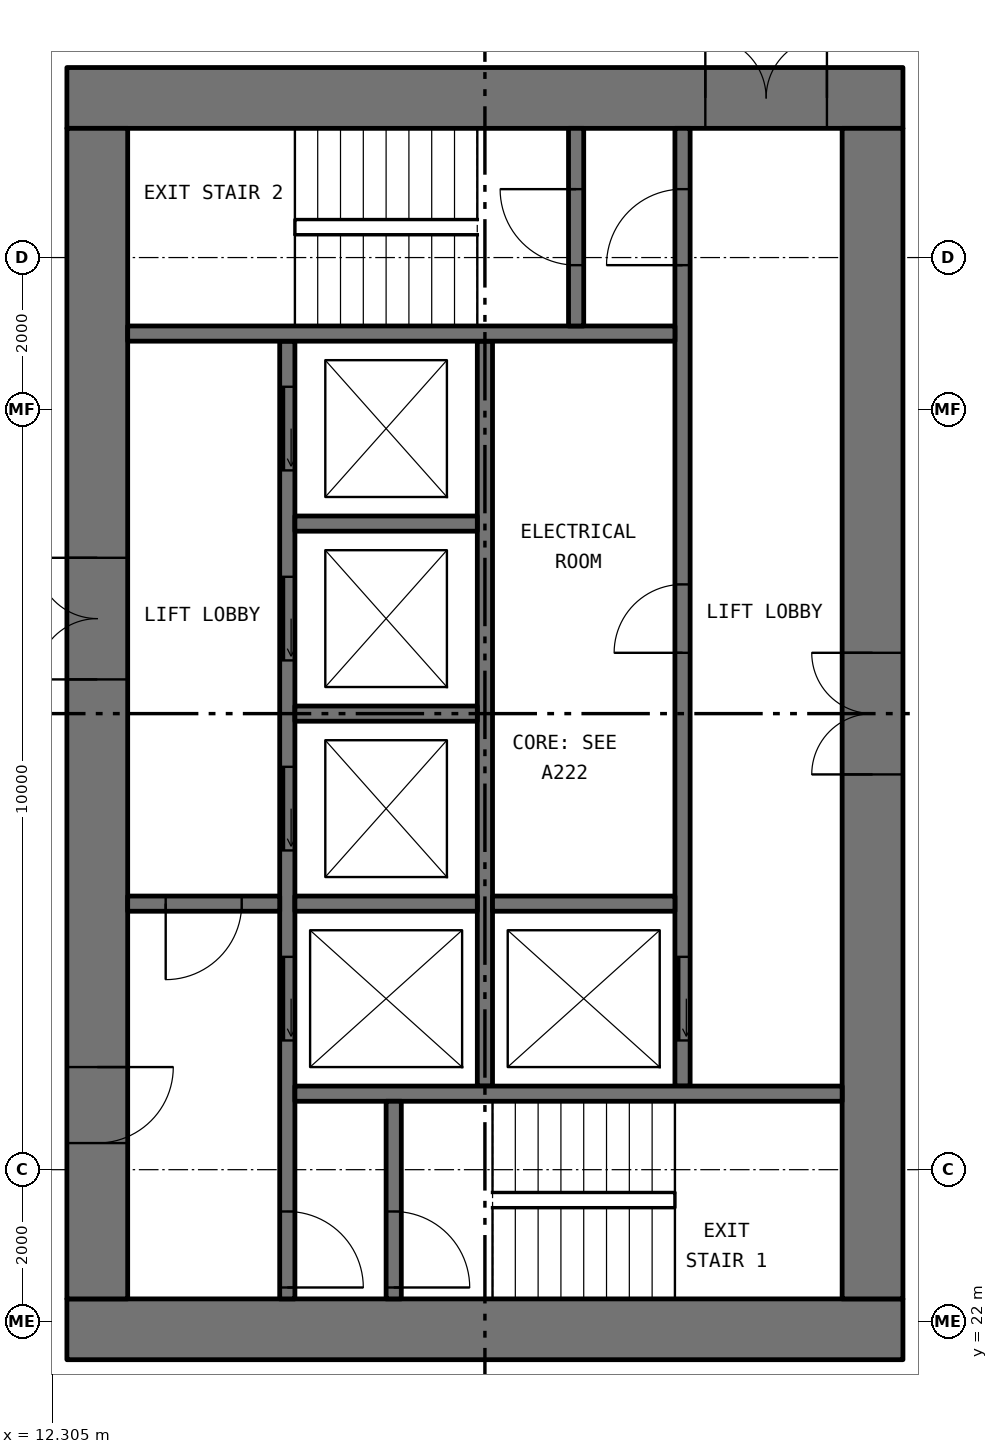
"""IFC4 building model, lengths in metres.
Left out: names, types, materials, properties, quantities, classifications, styles, units other than length and angle.
Written with IfcOpenShell. Run it as: python <this file> out.ifc"""

import sys

from ifc_helpers import new_model, si_unit, direction, frame, frame_2d, origin, place, context, subcontext, project, spatial, rectangle, extrude, element, fill, save


model = new_model("IFC4")
c1 = context("Model", 3, precision=1e-05, world=origin(), true_north=direction((0.0, 1.0)))
c2 = subcontext(c1, "Body", "Model", "MODEL_VIEW")
j1 = project(units=[si_unit("LENGTHUNIT", "METRE"), si_unit("PLANEANGLEUNIT", "RADIAN")], contexts=[c1])
p1 = place(None, origin())
s1 = spatial("IfcSite", under=j1, at=p1, CompositionType="ELEMENT")
p2 = place(p1, origin())
s2 = spatial("IfcBuilding", under=s1, at=p2, CompositionType="ELEMENT")
p3 = place(p2, frame((0.0, 0.0, 85.2)))
s3 = spatial("IfcBuildingStorey", under=s2, at=p3, CompositionType="ELEMENT", Elevation=85.2)
p4 = place(p3, frame((12.5, 21.9, 0.0), z_axis=(0.0, 0.0, 1.0), x_axis=(1.0, 0.0, 0.0)))
e1 = element("IfcWall", 1, at=p4, inside=s3, PredefinedType="SHEAR", context=c2, shape_type="SweptSolid", body=[
    extrude(rectangle(XDim=11.0, YDim=0.8, at=frame_2d((5.5, 0.0))), origin(), (0.0, 0.0, 1.0), 3.05),
])
p5 = place(p3, frame((12.5, 38.1, 0.0), z_axis=(0.0, 0.0, 1.0), x_axis=(1.0, 0.0, 0.0)))
e2 = element("IfcWall", 2, at=p5, inside=s3, PredefinedType="SHEAR", context=c2, shape_type="SweptSolid", body=[
    extrude(rectangle(XDim=11.0, YDim=0.8, at=frame_2d((5.5, 0.0))), origin(), (0.0, 0.0, 1.0), 3.05),
])
p6 = place(p5, frame((8.4, 0.0, 0.0)))
e3 = element("IfcOpeningElement", 3, at=p6, cuts=e2, PredefinedType="OPENING", context=c2, shape_type="SweptSolid", body=[
    extrude(rectangle(XDim=1.6, YDim=2.1, at=frame_2d((0.8, 1.05))), frame((0.0, 0.41, 0.0), z_axis=(0.0, -1.0, 0.0), x_axis=(1.0, 0.0, 0.0)), (0.0, 0.0, 1.0), 0.82),
])
p7 = place(p3, frame((12.9, 22.3, 0.0), z_axis=(0.0, 0.0, 1.0), x_axis=(0.0, 1.0, 0.0)))
e4 = element("IfcWall", 4, at=p7, inside=s3, PredefinedType="SHEAR", context=c2, shape_type="SweptSolid", body=[
    extrude(rectangle(XDim=15.4, YDim=0.8, at=frame_2d((7.7, 0.0))), origin(), (0.0, 0.0, 1.0), 3.05),
])
p8 = place(p7, frame((8.15, 0.0, 0.0)))
e5 = element("IfcOpeningElement", 5, at=p8, cuts=e4, PredefinedType="OPENING", context=c2, shape_type="SweptSolid", body=[
    extrude(rectangle(XDim=1.6, YDim=2.1, at=frame_2d((0.8, 1.05))), frame((0.0, 0.41, 0.0), z_axis=(0.0, -1.0, 0.0), x_axis=(1.0, 0.0, 0.0)), (0.0, 0.0, 1.0), 0.82),
])
p9 = place(p7, frame((2.05, 0.0, 0.0)))
e6 = element("IfcOpeningElement", 6, at=p9, cuts=e4, PredefinedType="OPENING", context=c2, shape_type="SweptSolid", body=[
    extrude(rectangle(XDim=1.0, YDim=2.1, at=frame_2d((0.5, 1.05))), frame((0.0, 0.41, 0.0), z_axis=(0.0, -1.0, 0.0), x_axis=(1.0, 0.0, 0.0)), (0.0, 0.0, 1.0), 0.82),
])
p10 = place(p3, frame((23.1, 22.3, 0.0), z_axis=(0.0, 0.0, 1.0), x_axis=(0.0, 1.0, 0.0)))
e7 = element("IfcWall", 7, at=p10, inside=s3, PredefinedType="SHEAR", context=c2, shape_type="SweptSolid", body=[
    extrude(rectangle(XDim=15.4, YDim=0.8, at=frame_2d((7.7, 0.0))), origin(), (0.0, 0.0, 1.0), 3.05),
])
p11 = place(p10, frame((6.9, 0.0, 0.0)))
e8 = element("IfcOpeningElement", 8, at=p11, cuts=e7, PredefinedType="OPENING", context=c2, shape_type="SweptSolid", body=[
    extrude(rectangle(XDim=1.6, YDim=2.1, at=frame_2d((0.8, 1.05))), frame((0.0, 0.41, 0.0), z_axis=(0.0, -1.0, 0.0), x_axis=(1.0, 0.0, 0.0)), (0.0, 0.0, 1.0), 0.82),
])
p12 = place(p3, frame((15.4, 22.3, 0.0), z_axis=(0.0, 0.0, 1.0), x_axis=(0.0, 1.0, 0.0)))
e9 = element("IfcWall", 9, at=p12, inside=s3, PredefinedType="SOLIDWALL", context=c2, shape_type="SweptSolid", body=[
    extrude(rectangle(XDim=12.6, YDim=0.2, at=frame_2d((6.3, 0.0))), origin(), (0.0, 0.0, 1.0), 3.05),
])
p13 = place(p12, frame((3.4, 0.0, 0.0)))
e10 = element("IfcOpeningElement", 10, at=p13, cuts=e9, PredefinedType="OPENING", context=c2, shape_type="SweptSolid", body=[
    extrude(rectangle(XDim=1.1, YDim=2.1, at=frame_2d((0.55, 1.05))), frame((0.0, 0.11, 0.0), z_axis=(0.0, -1.0, 0.0), x_axis=(1.0, 0.0, 0.0)), (0.0, 0.0, 1.0), 0.22),
])
p14 = place(p12, frame((5.9, 0.0, 0.0)))
e11 = element("IfcOpeningElement", 11, at=p14, cuts=e9, PredefinedType="OPENING", context=c2, shape_type="SweptSolid", body=[
    extrude(rectangle(XDim=1.1, YDim=2.1, at=frame_2d((0.55, 1.05))), frame((0.0, 0.11, 0.0), z_axis=(0.0, -1.0, 0.0), x_axis=(1.0, 0.0, 0.0)), (0.0, 0.0, 1.0), 0.22),
])
p15 = place(p12, frame((8.4, 0.0, 0.0)))
e12 = element("IfcOpeningElement", 12, at=p15, cuts=e9, PredefinedType="OPENING", context=c2, shape_type="SweptSolid", body=[
    extrude(rectangle(XDim=1.1, YDim=2.1, at=frame_2d((0.55, 1.05))), frame((0.0, 0.11, 0.0), z_axis=(0.0, -1.0, 0.0), x_axis=(1.0, 0.0, 0.0)), (0.0, 0.0, 1.0), 0.22),
])
p16 = place(p12, frame((10.9, 0.0, 0.0)))
e13 = element("IfcOpeningElement", 13, at=p16, cuts=e9, PredefinedType="OPENING", context=c2, shape_type="SweptSolid", body=[
    extrude(rectangle(XDim=1.1, YDim=2.1, at=frame_2d((0.55, 1.05))), frame((0.0, 0.11, 0.0), z_axis=(0.0, -1.0, 0.0), x_axis=(1.0, 0.0, 0.0)), (0.0, 0.0, 1.0), 0.22),
])
p17 = place(p12, frame((0.15, 0.0, 0.0)))
e14 = element("IfcOpeningElement", 14, at=p17, cuts=e9, PredefinedType="OPENING", context=c2, shape_type="SweptSolid", body=[
    extrude(rectangle(XDim=1.0, YDim=2.1, at=frame_2d((0.5, 1.05))), frame((0.0, 0.11, 0.0), z_axis=(0.0, -1.0, 0.0), x_axis=(1.0, 0.0, 0.0)), (0.0, 0.0, 1.0), 0.22),
])
p18 = place(p3, frame((20.6, 25.1, 0.0), z_axis=(0.0, 0.0, 1.0), x_axis=(0.0, 1.0, 0.0)))
e15 = element("IfcWall", 15, at=p18, inside=s3, PredefinedType="SOLIDWALL", context=c2, shape_type="SweptSolid", body=[
    extrude(rectangle(XDim=12.6, YDim=0.2, at=frame_2d((6.3, 0.0))), origin(), (0.0, 0.0, 1.0), 3.05),
])
p19 = place(p18, frame((0.6, 0.0, 0.0)))
e16 = element("IfcOpeningElement", 16, at=p19, cuts=e15, PredefinedType="OPENING", context=c2, shape_type="SweptSolid", body=[
    extrude(rectangle(XDim=1.1, YDim=2.1, at=frame_2d((0.55, 1.05))), frame((0.0, 0.11, 0.0), z_axis=(0.0, -1.0, 0.0), x_axis=(1.0, 0.0, 0.0)), (0.0, 0.0, 1.0), 0.22),
])
p20 = place(p18, frame((10.8, 0.0, 0.0)))
e17 = element("IfcOpeningElement", 17, at=p20, cuts=e15, PredefinedType="OPENING", context=c2, shape_type="SweptSolid", body=[
    extrude(rectangle(XDim=1.0, YDim=2.1, at=frame_2d((0.5, 1.05))), frame((0.0, 0.11, 0.0), z_axis=(0.0, -1.0, 0.0), x_axis=(1.0, 0.0, 0.0)), (0.0, 0.0, 1.0), 0.22),
])
p21 = place(p18, frame((5.7, 0.0, 0.0)))
e18 = element("IfcOpeningElement", 18, at=p21, cuts=e15, PredefinedType="OPENING", context=c2, shape_type="SweptSolid", body=[
    extrude(rectangle(XDim=0.9, YDim=2.1, at=frame_2d((0.45, 1.05))), frame((0.0, 0.11, 0.0), z_axis=(0.0, -1.0, 0.0), x_axis=(1.0, 0.0, 0.0)), (0.0, 0.0, 1.0), 0.22),
])
p22 = place(p3, frame((18.0, 25.1, 0.0), z_axis=(0.0, 0.0, 1.0), x_axis=(0.0, 1.0, 0.0)))
e19 = element("IfcWall", 19, at=p22, inside=s3, PredefinedType="SOLIDWALL", context=c2, shape_type="SweptSolid", body=[
    extrude(rectangle(XDim=9.8, YDim=0.2, at=frame_2d((4.9, 0.0))), origin(), (0.0, 0.0, 1.0), 3.05),
])
for number, where, z_axis, x_axis in (
    (20, (15.5, 25.0, 0.0), (0.0, 0.0, 1.0), (1.0, 0.0, 0.0)),
    (21, (13.3, 35.0, 0.0), (0.0, 0.0, 1.0), (1.0, 0.0, 0.0)),
):
    element("IfcWall", number, at=place(p3, frame(where, z_axis=z_axis, x_axis=x_axis)), inside=s3, PredefinedType="SOLIDWALL", context=c2, shape_type="SweptSolid", body=[
        extrude(rectangle(XDim=7.2, YDim=0.2, at=frame_2d((3.6, 0.0))), origin(), (0.0, 0.0, 1.0), 3.05),
    ])
p23 = place(p3, frame((13.3, 27.5, 0.0), z_axis=(0.0, 0.0, 1.0), x_axis=(1.0, 0.0, 0.0)))
e22 = element("IfcWall", 22, at=p23, inside=s3, PredefinedType="SOLIDWALL", context=c2, shape_type="SweptSolid", body=[
    extrude(rectangle(XDim=2.0, YDim=0.2, at=frame_2d((1.0, 0.0))), origin(), (0.0, 0.0, 1.0), 3.05),
])
p24 = place(p23, frame((0.5, 0.0, 0.0)))
e23 = element("IfcOpeningElement", 23, at=p24, cuts=e22, PredefinedType="OPENING", context=c2, shape_type="SweptSolid", body=[
    extrude(rectangle(XDim=1.0, YDim=2.1, at=frame_2d((0.5, 1.05))), frame((0.0, 0.11, 0.0), z_axis=(0.0, -1.0, 0.0), x_axis=(1.0, 0.0, 0.0)), (0.0, 0.0, 1.0), 0.22),
])
p25 = place(p3, frame((16.8, 22.3, 0.0), z_axis=(0.0, 0.0, 1.0), x_axis=(0.0, 1.0, 0.0)))
e24 = element("IfcWall", 24, at=p25, inside=s3, PredefinedType="SOLIDWALL", context=c2, shape_type="SweptSolid", body=[
    extrude(rectangle(XDim=2.6, YDim=0.2, at=frame_2d((1.3, 0.0))), origin(), (0.0, 0.0, 1.0), 3.05),
])
p26 = place(p25, frame((0.15, 0.0, 0.0)))
e25 = element("IfcOpeningElement", 25, at=p26, cuts=e24, PredefinedType="OPENING", context=c2, shape_type="SweptSolid", body=[
    extrude(rectangle(XDim=1.0, YDim=2.1, at=frame_2d((0.5, 1.05))), frame((0.0, 0.11, 0.0), z_axis=(0.0, -1.0, 0.0), x_axis=(1.0, 0.0, 0.0)), (0.0, 0.0, 1.0), 0.22),
])
p27 = place(p3, frame((19.2, 35.1, 0.0), z_axis=(0.0, 0.0, 1.0), x_axis=(0.0, 1.0, 0.0)))
e26 = element("IfcWall", 26, at=p27, inside=s3, PredefinedType="SOLIDWALL", context=c2, shape_type="SweptSolid", body=[
    extrude(rectangle(XDim=2.6, YDim=0.2, at=frame_2d((1.3, 0.0))), origin(), (0.0, 0.0, 1.0), 3.05),
])
p28 = place(p27, frame((0.8, 0.0, 0.0)))
e27 = element("IfcOpeningElement", 27, at=p28, cuts=e26, PredefinedType="OPENING", context=c2, shape_type="SweptSolid", body=[
    extrude(rectangle(XDim=1.0, YDim=2.1, at=frame_2d((0.5, 1.05))), frame((0.0, 0.11, 0.0), z_axis=(0.0, -1.0, 0.0), x_axis=(1.0, 0.0, 0.0)), (0.0, 0.0, 1.0), 0.22),
])
for number, where, z_axis, x_axis in (
    (28, (15.5, 27.5, 0.0), (0.0, 0.0, 1.0), (1.0, 0.0, 0.0)),
    (29, (15.5, 30.0, 0.0), (0.0, 0.0, 1.0), (1.0, 0.0, 0.0)),
    (30, (15.5, 32.5, 0.0), (0.0, 0.0, 1.0), (1.0, 0.0, 0.0)),
    (31, (18.1, 27.5, 0.0), (0.0, 0.0, 1.0), (1.0, 0.0, 0.0)),
):
    element("IfcWall", number, at=place(p3, frame(where, z_axis=z_axis, x_axis=x_axis)), inside=s3, PredefinedType="SOLIDWALL", context=c2, shape_type="SweptSolid", body=[
        extrude(rectangle(XDim=2.4, YDim=0.2, at=frame_2d((1.2, 0.0))), origin(), (0.0, 0.0, 1.0), 3.05),
    ])
p29 = place(p19, origin())
e32 = element("IfcDoor", 32, at=p29, inside=s3, OperationType="SLIDING_TO_LEFT", PredefinedType="DOOR", context=c2, shape_type="SweptSolid", body=[
    extrude(rectangle(XDim=1.1, YDim=2.1, at=frame_2d((0.55, 1.05))), frame((0.0, 0.025, 0.0), z_axis=(0.0, -1.0, 0.0), x_axis=(1.0, 0.0, 0.0)), (0.0, 0.0, 1.0), 0.05),
])
fill(e16, e32)
p30 = place(p13, origin())
e33 = element("IfcDoor", 33, at=p30, inside=s3, OperationType="SLIDING_TO_LEFT", PredefinedType="DOOR", context=c2, shape_type="SweptSolid", body=[
    extrude(rectangle(XDim=1.1, YDim=2.1, at=frame_2d((0.55, 1.05))), frame((0.0, 0.025, 0.0), z_axis=(0.0, -1.0, 0.0), x_axis=(1.0, 0.0, 0.0)), (0.0, 0.0, 1.0), 0.05),
])
fill(e10, e33)
p31 = place(p14, origin())
e34 = element("IfcDoor", 34, at=p31, inside=s3, OperationType="SLIDING_TO_LEFT", PredefinedType="DOOR", context=c2, shape_type="SweptSolid", body=[
    extrude(rectangle(XDim=1.1, YDim=2.1, at=frame_2d((0.55, 1.05))), frame((0.0, 0.025, 0.0), z_axis=(0.0, -1.0, 0.0), x_axis=(1.0, 0.0, 0.0)), (0.0, 0.0, 1.0), 0.05),
])
fill(e11, e34)
p32 = place(p15, origin())
e35 = element("IfcDoor", 35, at=p32, inside=s3, OperationType="SLIDING_TO_LEFT", PredefinedType="DOOR", context=c2, shape_type="SweptSolid", body=[
    extrude(rectangle(XDim=1.1, YDim=2.1, at=frame_2d((0.55, 1.05))), frame((0.0, 0.025, 0.0), z_axis=(0.0, -1.0, 0.0), x_axis=(1.0, 0.0, 0.0)), (0.0, 0.0, 1.0), 0.05),
])
fill(e12, e35)
p33 = place(p16, origin())
e36 = element("IfcDoor", 36, at=p33, inside=s3, OperationType="SLIDING_TO_LEFT", PredefinedType="DOOR", context=c2, shape_type="SweptSolid", body=[
    extrude(rectangle(XDim=1.1, YDim=2.1, at=frame_2d((0.55, 1.05))), frame((0.0, 0.025, 0.0), z_axis=(0.0, -1.0, 0.0), x_axis=(1.0, 0.0, 0.0)), (0.0, 0.0, 1.0), 0.05),
])
fill(e13, e36)
p34 = place(p26, frame((1.0, 0.0, 0.0), x_axis=(-1.0, 0.0, 0.0)))
e37 = element("IfcDoor", 37, at=p34, inside=s3, OperationType="SINGLE_SWING_LEFT", PredefinedType="DOOR", context=c2, shape_type="SweptSolid", body=[
    extrude(rectangle(XDim=1.0, YDim=2.1, at=frame_2d((0.5, 1.05))), frame((0.0, 0.025, 0.0), z_axis=(0.0, -1.0, 0.0), x_axis=(1.0, 0.0, 0.0)), (0.0, 0.0, 1.0), 0.05),
])
fill(e25, e37)
p35 = place(p17, frame((1.0, 0.0, 0.0), x_axis=(-1.0, 0.0, 0.0)))
e38 = element("IfcDoor", 38, at=p35, inside=s3, OperationType="SINGLE_SWING_LEFT", PredefinedType="DOOR", context=c2, shape_type="SweptSolid", body=[
    extrude(rectangle(XDim=1.0, YDim=2.1, at=frame_2d((0.5, 1.05))), frame((0.0, 0.025, 0.0), z_axis=(0.0, -1.0, 0.0), x_axis=(1.0, 0.0, 0.0)), (0.0, 0.0, 1.0), 0.05),
])
fill(e14, e38)
p36 = place(p20, origin())
e39 = element("IfcDoor", 39, at=p36, inside=s3, OperationType="SINGLE_SWING_RIGHT", PredefinedType="DOOR", context=c2, shape_type="SweptSolid", body=[
    extrude(rectangle(XDim=1.0, YDim=2.1, at=frame_2d((0.5, 1.05))), frame((0.0, 0.025, 0.0), z_axis=(0.0, -1.0, 0.0), x_axis=(1.0, 0.0, 0.0)), (0.0, 0.0, 1.0), 0.05),
])
fill(e17, e39)
p37 = place(p28, origin())
e40 = element("IfcDoor", 40, at=p37, inside=s3, OperationType="SINGLE_SWING_LEFT", PredefinedType="DOOR", context=c2, shape_type="SweptSolid", body=[
    extrude(rectangle(XDim=1.0, YDim=2.1, at=frame_2d((0.5, 1.05))), frame((0.0, 0.025, 0.0), z_axis=(0.0, -1.0, 0.0), x_axis=(1.0, 0.0, 0.0)), (0.0, 0.0, 1.0), 0.05),
])
fill(e27, e40)
p38 = place(p24, frame((1.0, 0.0, 0.0), x_axis=(-1.0, 0.0, 0.0)))
e41 = element("IfcDoor", 41, at=p38, inside=s3, OperationType="SINGLE_SWING_LEFT", PredefinedType="DOOR", context=c2, shape_type="SweptSolid", body=[
    extrude(rectangle(XDim=1.0, YDim=2.1, at=frame_2d((0.5, 1.05))), frame((0.0, 0.025, 0.0), z_axis=(0.0, -1.0, 0.0), x_axis=(1.0, 0.0, 0.0)), (0.0, 0.0, 1.0), 0.05),
])
fill(e23, e41)
p39 = place(p8, origin())
e42 = element("IfcDoor", 42, at=p39, inside=s3, OperationType="DOUBLE_DOOR_SINGLE_SWING", PredefinedType="DOOR", context=c2, shape_type="SweptSolid", body=[
    extrude(rectangle(XDim=1.6, YDim=2.1, at=frame_2d((0.8, 1.05))), frame((0.0, 0.025, 0.0), z_axis=(0.0, -1.0, 0.0), x_axis=(1.0, 0.0, 0.0)), (0.0, 0.0, 1.0), 0.05),
])
fill(e5, e42)
p40 = place(p9, frame((1.0, 0.0, 0.0), x_axis=(-1.0, 0.0, 0.0)))
e43 = element("IfcDoor", 43, at=p40, inside=s3, OperationType="SINGLE_SWING_RIGHT", PredefinedType="DOOR", context=c2, shape_type="SweptSolid", body=[
    extrude(rectangle(XDim=1.0, YDim=2.1, at=frame_2d((0.5, 1.05))), frame((0.0, 0.025, 0.0), z_axis=(0.0, -1.0, 0.0), x_axis=(1.0, 0.0, 0.0)), (0.0, 0.0, 1.0), 0.05),
])
fill(e6, e43)
p41 = place(p6, origin())
e44 = element("IfcDoor", 44, at=p41, inside=s3, OperationType="DOUBLE_DOOR_SINGLE_SWING", PredefinedType="DOOR", context=c2, shape_type="SweptSolid", body=[
    extrude(rectangle(XDim=1.6, YDim=2.1, at=frame_2d((0.8, 1.05))), frame((0.0, 0.025, 0.0), z_axis=(0.0, -1.0, 0.0), x_axis=(1.0, 0.0, 0.0)), (0.0, 0.0, 1.0), 0.05),
])
fill(e3, e44)
p42 = place(p11, origin())
e45 = element("IfcDoor", 45, at=p42, inside=s3, OperationType="DOUBLE_DOOR_SINGLE_SWING", PredefinedType="DOOR", context=c2, shape_type="SweptSolid", body=[
    extrude(rectangle(XDim=1.6, YDim=2.1, at=frame_2d((0.8, 1.05))), frame((0.0, 0.025, 0.0), z_axis=(0.0, -1.0, 0.0), x_axis=(1.0, 0.0, 0.0)), (0.0, 0.0, 1.0), 0.05),
])
fill(e8, e45)
p43 = place(p21, origin())
e46 = element("IfcDoor", 46, at=p43, inside=s3, OperationType="SINGLE_SWING_RIGHT", PredefinedType="DOOR", context=c2, shape_type="SweptSolid", body=[
    extrude(rectangle(XDim=0.9, YDim=2.1, at=frame_2d((0.45, 1.05))), frame((0.0, 0.025, 0.0), z_axis=(0.0, -1.0, 0.0), x_axis=(1.0, 0.0, 0.0)), (0.0, 0.0, 1.0), 0.05),
])
fill(e18, e46)
save(model, sys.argv[1])
